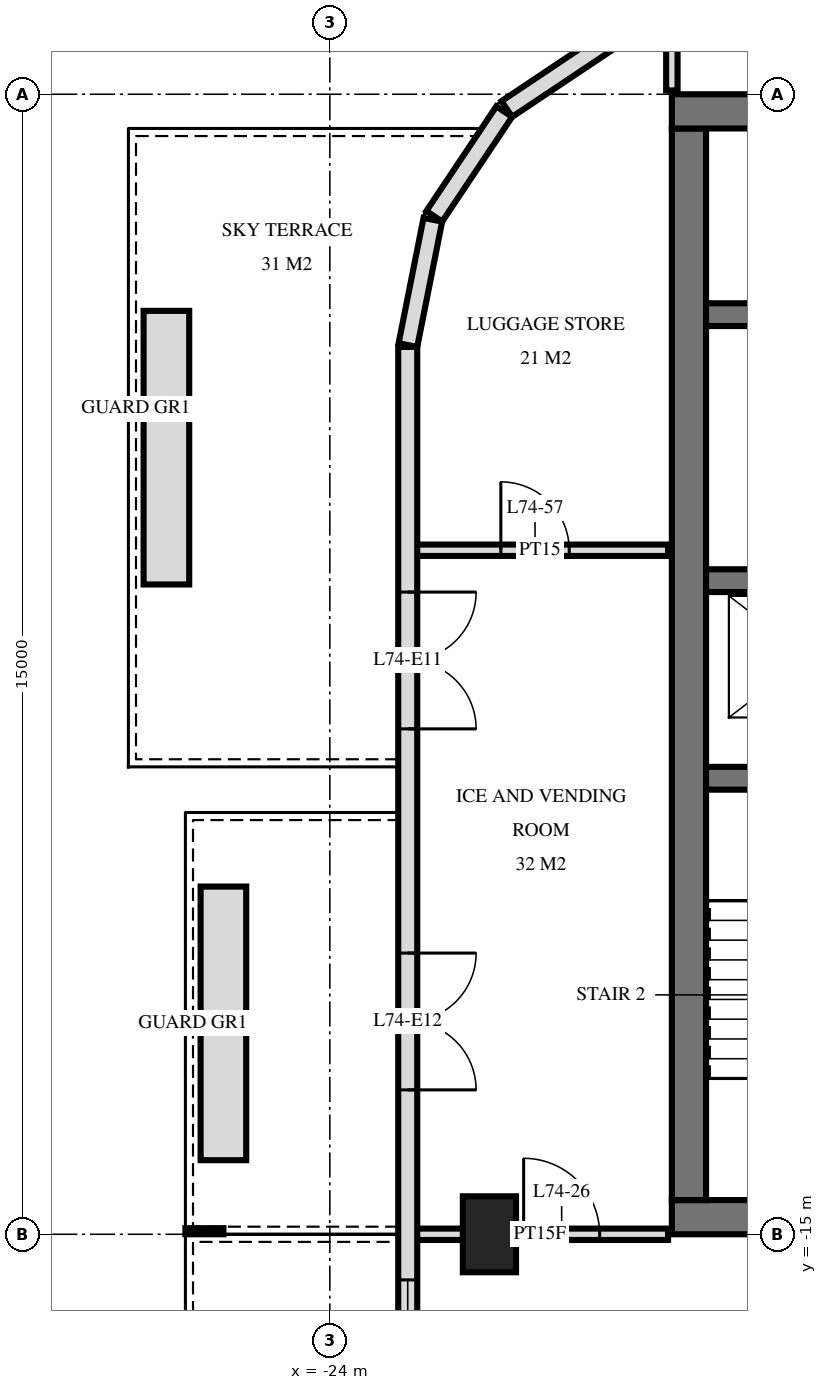
"""IFC4 building model, lengths in metres.
Left out: names, types, materials, properties, quantities, classifications, styles, units other than length and angle.
Written with IfcOpenShell. Run it as: python <this file> out.ifc"""

import sys

from ifc_helpers import new_model, si_unit, direction, frame, frame_2d, origin, origin_2d, place, context, subcontext, project, spatial, rectangle, extrude, element, fill, save


model = new_model("IFC4")
c1 = context("Model", 3, precision=1e-05, world=origin(), true_north=direction((0.0, 1.0)))
c2 = subcontext(c1, "Body", "Model", "MODEL_VIEW")
j1 = project(units=[si_unit("LENGTHUNIT", "METRE"), si_unit("PLANEANGLEUNIT", "RADIAN")], contexts=[c1])
p1 = place(None, origin())
s1 = spatial("IfcSite", under=j1, at=p1, CompositionType="ELEMENT")
p2 = place(p1, origin())
s2 = spatial("IfcBuilding", under=s1, at=p2, CompositionType="ELEMENT")
p3 = place(p2, frame((0.0, 0.0, 280.6)))
s3 = spatial("IfcBuildingStorey", under=s2, at=p3, CompositionType="ELEMENT", Elevation=280.6)
p4 = place(p3, frame((-21.9, -15.0, 0.0), z_axis=(0.0, 0.0, 1.0), x_axis=(0.0, 1.0, 0.0)))
e1 = element("IfcColumn", 1, at=p4, inside=s3, PredefinedType="COLUMN", context=c2, shape_type="SweptSolid", body=[
    extrude(rectangle(XDim=1.0, YDim=0.7, at=origin_2d()), origin(), (0.0, 0.0, 1.0), 3.5),
])
p5 = place(p3, frame((-19.5, -0.225, 0.0), z_axis=(0.0, 0.0, 1.0), x_axis=(1.0, 0.0, 0.0)))
e2 = element("IfcWall", 2, at=p5, inside=s3, PredefinedType="SHEAR", context=c2, shape_type="SweptSolid", body=[
    extrude(rectangle(XDim=9.5, YDim=0.45, at=frame_2d((4.75, 0.0))), origin(), (0.0, 0.0, 1.0), 3.5),
])
p6 = place(p3, frame((-19.5, -14.775, 0.0), z_axis=(0.0, 0.0, 1.0), x_axis=(1.0, 0.0, 0.0)))
e3 = element("IfcWall", 3, at=p6, inside=s3, PredefinedType="SHEAR", context=c2, shape_type="SweptSolid", body=[
    extrude(rectangle(XDim=9.5, YDim=0.45, at=frame_2d((4.75, 0.0))), origin(), (0.0, 0.0, 1.0), 3.5),
])
p7 = place(p6, frame((1.2, 0.0, 0.0)))
e4 = element("IfcOpeningElement", 4, at=p7, cuts=e3, PredefinedType="OPENING", context=c2, shape_type="SweptSolid", body=[
    extrude(rectangle(XDim=1.2, YDim=2.1, at=frame_2d((0.6, 1.05))), frame((0.0, 0.235, 0.0), z_axis=(0.0, -1.0, 0.0), x_axis=(1.0, 0.0, 0.0)), (0.0, 0.0, 1.0), 0.47),
])
p8 = place(p6, frame((4.25, 0.0, 0.0)))
e5 = element("IfcOpeningElement", 5, at=p8, cuts=e3, PredefinedType="OPENING", context=c2, shape_type="SweptSolid", body=[
    extrude(rectangle(XDim=1.1, YDim=2.1, at=frame_2d((0.55, 1.05))), frame((0.0, 0.235, 0.0), z_axis=(0.0, -1.0, 0.0), x_axis=(1.0, 0.0, 0.0)), (0.0, 0.0, 1.0), 0.47),
])
p9 = place(p3, frame((-19.275, -14.55, 0.0), z_axis=(0.0, 0.0, 1.0), x_axis=(0.0, 1.0, 0.0)))
e6 = element("IfcWall", 6, at=p9, inside=s3, PredefinedType="SHEAR", context=c2, shape_type="SweptSolid", body=[
    extrude(rectangle(XDim=14.1, YDim=0.45, at=frame_2d((7.05, 0.0))), origin(), (0.0, 0.0, 1.0), 3.5),
])
p10 = place(p3, frame((-19.05, -2.9, 0.0), z_axis=(0.0, 0.0, 1.0), x_axis=(1.0, 0.0, 0.0)))
e7 = element("IfcWall", 7, at=p10, inside=s3, PredefinedType="SHEAR", context=c2, shape_type="SweptSolid", body=[
    extrude(rectangle(XDim=8.7, YDim=0.3, at=frame_2d((4.35, 0.0))), origin(), (0.0, 0.0, 1.0), 3.5),
])
p11 = place(p10, frame((6.8, 0.0, 0.0)))
e8 = element("IfcOpeningElement", 8, at=p11, cuts=e7, PredefinedType="OPENING", context=c2, shape_type="SweptSolid", body=[
    extrude(rectangle(XDim=1.1, YDim=2.1, at=frame_2d((0.55, 1.05))), frame((0.0, 0.16, 0.0), z_axis=(0.0, -1.0, 0.0), x_axis=(1.0, 0.0, 0.0)), (0.0, 0.0, 1.0), 0.32),
])
p12 = place(p10, frame((3.8, 0.0, 0.0)))
e9 = element("IfcOpeningElement", 9, at=p12, cuts=e7, PredefinedType="OPENING", context=c2, shape_type="SweptSolid", body=[
    extrude(rectangle(XDim=1.1, YDim=2.1, at=frame_2d((0.55, 1.05))), frame((0.0, 0.16, 0.0), z_axis=(0.0, -1.0, 0.0), x_axis=(1.0, 0.0, 0.0)), (0.0, 0.0, 1.0), 0.32),
])
p13 = place(p10, frame((0.9, 0.0, 0.0)))
e10 = element("IfcOpeningElement", 10, at=p13, cuts=e7, PredefinedType="OPENING", context=c2, shape_type="SweptSolid", body=[
    extrude(rectangle(XDim=0.9, YDim=2.1, at=frame_2d((0.45, 1.05))), frame((0.0, 0.16, 0.0), z_axis=(0.0, -1.0, 0.0), x_axis=(1.0, 0.0, 0.0)), (0.0, 0.0, 1.0), 0.32),
])
p14 = place(p3, frame((-19.05, -6.4, 0.0), z_axis=(0.0, 0.0, 1.0), x_axis=(1.0, 0.0, 0.0)))
e11 = element("IfcWall", 11, at=p14, inside=s3, PredefinedType="SHEAR", context=c2, shape_type="SweptSolid", body=[
    extrude(rectangle(XDim=8.7, YDim=0.3, at=frame_2d((4.35, 0.0))), origin(), (0.0, 0.0, 1.0), 3.5),
])
p15 = place(p14, frame((0.8, 0.0, 0.0)))
e12 = element("IfcOpeningElement", 12, at=p15, cuts=e11, PredefinedType="OPENING", context=c2, shape_type="SweptSolid", body=[
    extrude(rectangle(XDim=1.1, YDim=2.1, at=frame_2d((0.55, 1.05))), frame((0.0, 0.16, 0.0), z_axis=(0.0, -1.0, 0.0), x_axis=(1.0, 0.0, 0.0)), (0.0, 0.0, 1.0), 0.32),
])
p16 = place(p3, frame((-19.05, -9.0, 0.0), z_axis=(0.0, 0.0, 1.0), x_axis=(1.0, 0.0, 0.0)))
e13 = element("IfcWall", 13, at=p16, inside=s3, PredefinedType="SHEAR", context=c2, shape_type="SweptSolid", body=[
    extrude(rectangle(XDim=8.7, YDim=0.3, at=frame_2d((4.35, 0.0))), origin(), (0.0, 0.0, 1.0), 3.5),
])
p17 = place(p16, frame((3.8, 0.0, 0.0)))
e14 = element("IfcOpeningElement", 14, at=p17, cuts=e13, PredefinedType="OPENING", context=c2, shape_type="SweptSolid", body=[
    extrude(rectangle(XDim=1.1, YDim=2.1, at=frame_2d((0.55, 1.05))), frame((0.0, 0.16, 0.0), z_axis=(0.0, -1.0, 0.0), x_axis=(1.0, 0.0, 0.0)), (0.0, 0.0, 1.0), 0.32),
])
for number, where, z_axis, x_axis in (
    (15, (-20.294, 0.726, 0.0), (0.0, 0.0, 1.0), (-0.831, -0.556, 0.0)),
    (16, (-21.706, -0.229, 0.0), (0.0, 0.0, 1.0), (-0.556, -0.831, 0.0)),
):
    element("IfcWall", number, at=place(p3, frame(where, z_axis=z_axis, x_axis=x_axis)), inside=s3, PredefinedType="SOLIDWALL", context=c2, shape_type="SweptSolid", body=[
        extrude(rectangle(XDim=1.656, YDim=0.25, at=frame_2d((0.828, 0.0))), origin(), (0.0, 0.0, 1.0), 3.22),
    ])
p18 = place(p3, frame((-22.645, -1.651, 0.0), z_axis=(0.0, 0.0, 1.0), x_axis=(-0.19513878023, -0.980775640221, 0.0)))
e17 = element("IfcWall", 17, at=p18, inside=s3, PredefinedType="SOLIDWALL", context=c2, shape_type="SweptSolid", body=[
    extrude(rectangle(XDim=1.681, YDim=0.25, at=frame_2d((0.841, 0.0))), origin(), (0.0, 0.0, 1.0), 3.22),
])
p19 = place(p3, frame((-22.975, -3.325, 0.0), z_axis=(0.0, 0.0, 1.0), x_axis=(0.0, -1.0, 0.0)))
e18 = element("IfcWall", 18, at=p19, inside=s3, PredefinedType="SOLIDWALL", context=c2, shape_type="SweptSolid", body=[
    extrude(rectangle(XDim=25.951, YDim=0.25, at=frame_2d((12.975, 0.0))), origin(), (0.0, 0.0, 1.0), 3.22),
])
p20 = place(p19, frame((3.225, 0.0, 0.0)))
e19 = element("IfcOpeningElement", 19, at=p20, cuts=e18, PredefinedType="OPENING", context=c2, shape_type="SweptSolid", body=[
    extrude(rectangle(XDim=1.8, YDim=2.4, at=frame_2d((0.9, 1.2))), frame((0.0, 0.135, 0.0), z_axis=(0.0, -1.0, 0.0), x_axis=(1.0, 0.0, 0.0)), (0.0, 0.0, 1.0), 0.27),
])
p21 = place(p19, frame((7.975, 0.0, 0.0)))
e20 = element("IfcOpeningElement", 20, at=p21, cuts=e18, PredefinedType="OPENING", context=c2, shape_type="SweptSolid", body=[
    extrude(rectangle(XDim=1.8, YDim=2.4, at=frame_2d((0.9, 1.2))), frame((0.0, 0.135, 0.0), z_axis=(0.0, -1.0, 0.0), x_axis=(1.0, 0.0, 0.0)), (0.0, 0.0, 1.0), 0.27),
])
p22 = place(p19, frame((12.275, 0.0, 0.9)))
e21 = element("IfcOpeningElement", 21, at=p22, cuts=e18, PredefinedType="OPENING", context=c2, shape_type="SweptSolid", body=[
    extrude(rectangle(XDim=1.2, YDim=1.5, at=frame_2d((0.6, 0.75))), frame((0.0, 0.135, 0.0), z_axis=(0.0, -1.0, 0.0), x_axis=(1.0, 0.0, 0.0)), (0.0, 0.0, 1.0), 0.27),
])
p23 = place(p19, frame((18.175, 0.0, 0.0)))
e22 = element("IfcOpeningElement", 22, at=p23, cuts=e18, PredefinedType="OPENING", context=c2, shape_type="SweptSolid", body=[
    extrude(rectangle(XDim=1.8, YDim=2.4, at=frame_2d((0.9, 1.2))), frame((0.0, 0.135, 0.0), z_axis=(0.0, -1.0, 0.0), x_axis=(1.0, 0.0, 0.0)), (0.0, 0.0, 1.0), 0.27),
])
p24 = place(p19, frame((21.075, 0.0, 0.0)))
e23 = element("IfcOpeningElement", 23, at=p24, cuts=e18, PredefinedType="OPENING", context=c2, shape_type="SweptSolid", body=[
    extrude(rectangle(XDim=1.8, YDim=2.4, at=frame_2d((0.9, 1.2))), frame((0.0, 0.135, 0.0), z_axis=(0.0, -1.0, 0.0), x_axis=(1.0, 0.0, 0.0)), (0.0, 0.0, 1.0), 0.27),
])
p25 = place(p19, frame((23.825, 0.0, 0.9)))
e24 = element("IfcOpeningElement", 24, at=p25, cuts=e18, PredefinedType="OPENING", context=c2, shape_type="SweptSolid", body=[
    extrude(rectangle(XDim=1.8, YDim=1.5, at=frame_2d((0.9, 0.75))), frame((0.0, 0.135, 0.0), z_axis=(0.0, -1.0, 0.0), x_axis=(1.0, 0.0, 0.0)), (0.0, 0.0, 1.0), 0.27),
])
for number, where, z_axis, x_axis in (
    (25, (-25.4, -14.025, 0.0), (0.0, 0.0, 1.0), (0.0, 1.0, 0.0)),
    (26, (-26.15, -6.45, 0.0), (0.0, 0.0, 1.0), (0.0, 1.0, 0.0)),
):
    element("IfcWall", number, at=place(p3, frame(where, z_axis=z_axis, x_axis=x_axis)), inside=s3, PredefinedType="USERDEFINED", context=c2, shape_type="SweptSolid", body=[
        extrude(rectangle(XDim=3.6, YDim=0.6, at=frame_2d((1.8, 0.0))), origin(), (0.0, 0.0, 1.0), 0.65),
    ])
p26 = place(p3, frame((-19.5, 0.05, 0.0), z_axis=(0.0, 0.0, 1.0), x_axis=(0.0, 1.0, 0.0)))
e27 = element("IfcWall", 27, at=p26, inside=s3, PredefinedType="PARTITIONING", context=c2, shape_type="SweptSolid", body=[
    extrude(rectangle(XDim=0.787, YDim=0.15, at=frame_2d((0.394, 0.0))), origin(), (0.0, 0.0, 1.0), 3.22),
])
p27 = place(p3, frame((-22.92, -15.0, 0.0), z_axis=(0.0, 0.0, 1.0), x_axis=(1.0, 0.0, 0.0)))
e28 = element("IfcWall", 28, at=p27, inside=s3, PredefinedType="PARTITIONING", context=c2, shape_type="SweptSolid", body=[
    extrude(rectangle(XDim=3.37, YDim=0.15, at=frame_2d((1.685, 0.0))), origin(), (0.0, 0.0, 1.0), 3.22),
])
p28 = place(p27, frame((1.47, 0.0, 0.0)))
e29 = element("IfcOpeningElement", 29, at=p28, cuts=e28, PredefinedType="OPENING", context=c2, shape_type="SweptSolid", body=[
    extrude(rectangle(XDim=1.0, YDim=2.1, at=frame_2d((0.5, 1.05))), frame((0.0, 0.085, 0.0), z_axis=(0.0, -1.0, 0.0), x_axis=(1.0, 0.0, 0.0)), (0.0, 0.0, 1.0), 0.17),
])
p29 = place(p3, frame((-22.92, -6.0, 0.0), z_axis=(0.0, 0.0, 1.0), x_axis=(1.0, 0.0, 0.0)))
e30 = element("IfcWall", 30, at=p29, inside=s3, PredefinedType="PARTITIONING", context=c2, shape_type="SweptSolid", body=[
    extrude(rectangle(XDim=3.37, YDim=0.15, at=frame_2d((1.685, 0.0))), origin(), (0.0, 0.0, 1.0), 3.22),
])
p30 = place(p29, frame((1.17, 0.0, 0.0)))
e31 = element("IfcOpeningElement", 31, at=p30, cuts=e30, PredefinedType="OPENING", context=c2, shape_type="SweptSolid", body=[
    extrude(rectangle(XDim=0.9, YDim=2.1, at=frame_2d((0.45, 1.05))), frame((0.0, 0.085, 0.0), z_axis=(0.0, -1.0, 0.0), x_axis=(1.0, 0.0, 0.0)), (0.0, 0.0, 1.0), 0.17),
])
p31 = place(p20, origin())
e32 = element("IfcDoor", 32, at=p31, inside=s3, OperationType="DOUBLE_DOOR_SINGLE_SWING", PredefinedType="DOOR", context=c2, shape_type="SweptSolid", body=[
    extrude(rectangle(XDim=1.8, YDim=2.4, at=frame_2d((0.9, 1.2))), frame((0.0, 0.025, 0.0), z_axis=(0.0, -1.0, 0.0), x_axis=(1.0, 0.0, 0.0)), (0.0, 0.0, 1.0), 0.05),
])
fill(e19, e32)
p32 = place(p21, origin())
e33 = element("IfcDoor", 33, at=p32, inside=s3, OperationType="DOUBLE_DOOR_SINGLE_SWING", PredefinedType="DOOR", context=c2, shape_type="SweptSolid", body=[
    extrude(rectangle(XDim=1.8, YDim=2.4, at=frame_2d((0.9, 1.2))), frame((0.0, 0.025, 0.0), z_axis=(0.0, -1.0, 0.0), x_axis=(1.0, 0.0, 0.0)), (0.0, 0.0, 1.0), 0.05),
])
fill(e20, e33)
p33 = place(p22, origin())
e34 = element("IfcWindow", 34, at=p33, inside=s3, PartitioningType="SINGLE_PANEL", PredefinedType="WINDOW", context=c2, shape_type="SweptSolid", body=[
    extrude(rectangle(XDim=1.2, YDim=1.5, at=frame_2d((0.6, 0.75))), frame((0.0, 0.03, 0.0), z_axis=(0.0, -1.0, 0.0), x_axis=(1.0, 0.0, 0.0)), (0.0, 0.0, 1.0), 0.06),
])
fill(e21, e34)
p34 = place(p28, origin())
e35 = element("IfcDoor", 35, at=p34, inside=s3, OperationType="SINGLE_SWING_RIGHT", PredefinedType="DOOR", context=c2, shape_type="SweptSolid", body=[
    extrude(rectangle(XDim=1.0, YDim=2.1, at=frame_2d((0.5, 1.05))), frame((0.0, 0.025, 0.0), z_axis=(0.0, -1.0, 0.0), x_axis=(1.0, 0.0, 0.0)), (0.0, 0.0, 1.0), 0.05),
])
fill(e29, e35)
p35 = place(p30, origin())
e36 = element("IfcDoor", 36, at=p35, inside=s3, OperationType="SINGLE_SWING_RIGHT", PredefinedType="DOOR", context=c2, shape_type="SweptSolid", body=[
    extrude(rectangle(XDim=0.9, YDim=2.1, at=frame_2d((0.45, 1.05))), frame((0.0, 0.025, 0.0), z_axis=(0.0, -1.0, 0.0), x_axis=(1.0, 0.0, 0.0)), (0.0, 0.0, 1.0), 0.05),
])
fill(e31, e36)
save(model, sys.argv[1])
